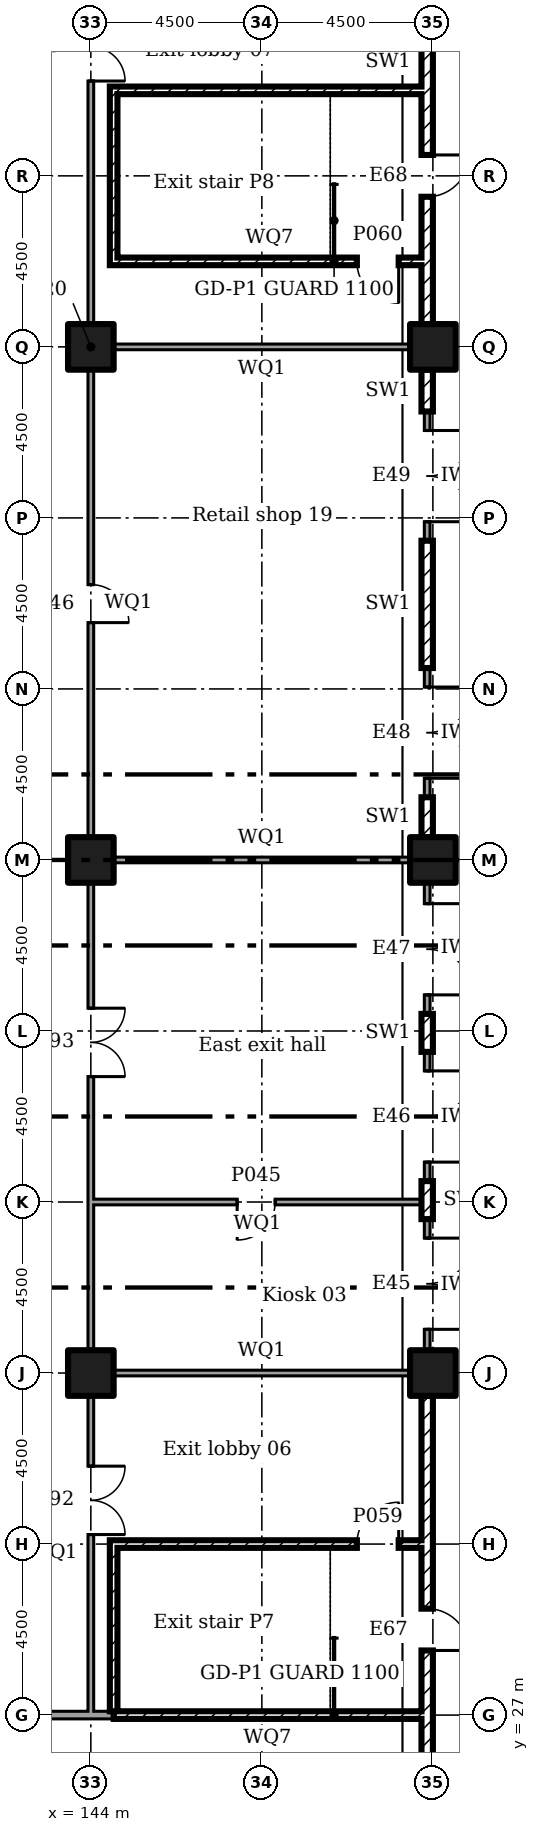
"""IFC4 building model, lengths in metres.
Left out: names, types, materials, properties, quantities, classifications, styles, units other than length and angle.
Written with IfcOpenShell. Run it as: python <this file> out.ifc"""

import sys

from ifc_helpers import new_model, si_unit, direction, frame, frame_2d, origin, origin_2d, place, context, subcontext, project, spatial, rectangle, extrude, element, fill, save


model = new_model("IFC4")
c1 = context("Model", 3, precision=1e-05, world=origin(), true_north=direction((0.0, 1.0)))
c2 = subcontext(c1, "Body", "Model", "MODEL_VIEW")
j1 = project(units=[si_unit("LENGTHUNIT", "METRE"), si_unit("PLANEANGLEUNIT", "RADIAN")], contexts=[c1])
p1 = place(None, origin())
s1 = spatial("IfcSite", under=j1, at=p1, CompositionType="ELEMENT")
p2 = place(p1, origin())
s2 = spatial("IfcBuilding", under=s1, at=p2, CompositionType="ELEMENT")
p3 = place(p2, origin())
s3 = spatial("IfcBuildingStorey", under=s2, at=p3, CompositionType="ELEMENT", Elevation=0.0)
for number, where in (
    (1, (144.0, 36.0, 0.0)),
    (2, (144.0, 49.5, 0.0)),
    (3, (144.0, 63.0, 0.0)),
    (4, (153.0, 36.0, 0.0)),
    (5, (153.0, 49.5, 0.0)),
    (6, (153.0, 63.0, 0.0)),
):
    element("IfcColumn", number, at=place(p3, frame(where)), inside=s3, PredefinedType="COLUMN", context=c2, shape_type="SweptSolid", body=[
        extrude(rectangle(XDim=1.2, YDim=1.2, at=origin_2d()), origin(), (0.0, 0.0, 1.0), 6.0),
    ])
p4 = place(p3, frame((152.85, 23.1, 0.0), z_axis=(0.0, 0.0, 1.0), x_axis=(0.0, 1.0, 0.0)))
e7 = element("IfcWall", 7, at=p4, inside=s3, PredefinedType="ELEMENTEDWALL", context=c2, shape_type="SweptSolid", body=[
    extrude(rectangle(XDim=5.1, YDim=0.3, at=frame_2d((2.55, 0.0))), origin(), (0.0, 0.0, 1.0), 5.55),
])
p5 = place(p3, frame((152.85, 28.2, 0.0), z_axis=(0.0, 0.0, 1.0), x_axis=(0.0, 1.0, 0.0)))
e8 = element("IfcWall", 8, at=p5, inside=s3, PredefinedType="ELEMENTEDWALL", context=c2, shape_type="SweptSolid", body=[
    extrude(rectangle(XDim=2.1, YDim=0.3, at=frame_2d((1.05, 0.0))), origin(), (0.0, 0.0, 1.0), 5.55),
])
p6 = place(p5, frame((0.5, 0.0, 0.0)))
e9 = element("IfcOpeningElement", 9, at=p6, cuts=e8, PredefinedType="OPENING", context=c2, shape_type="SweptSolid", body=[
    extrude(rectangle(XDim=1.1, YDim=2.4, at=frame_2d((0.55, 1.2))), frame((0.0, 0.16, 0.0), z_axis=(0.0, -1.0, 0.0), x_axis=(1.0, 0.0, 0.0)), (0.0, 0.0, 1.0), 0.32),
])
p7 = place(p3, frame((152.85, 30.3, 0.0), z_axis=(0.0, 0.0, 1.0), x_axis=(0.0, 1.0, 0.0)))
e10 = element("IfcWall", 10, at=p7, inside=s3, PredefinedType="ELEMENTEDWALL", context=c2, shape_type="SweptSolid", body=[
    extrude(rectangle(XDim=5.1, YDim=0.3, at=frame_2d((2.55, 0.0))), origin(), (0.0, 0.0, 1.0), 5.55),
])
p8 = place(p3, frame((152.85, 36.6, 0.0), z_axis=(0.0, 0.0, 1.0), x_axis=(0.0, 1.0, 0.0)))
e11 = element("IfcWall", 11, at=p8, inside=s3, PredefinedType="SOLIDWALL", context=c2, shape_type="SweptSolid", body=[
    extrude(rectangle(XDim=3.45, YDim=0.15, at=frame_2d((1.725, 0.0))), origin(), (0.0, 0.0, 1.0), 5.55),
])
p9 = place(p8, frame((0.55, 0.0, 0.0)))
e12 = element("IfcOpeningElement", 12, at=p9, cuts=e11, PredefinedType="OPENING", context=c2, shape_type="SweptSolid", body=[
    extrude(rectangle(XDim=2.4, YDim=2.7, at=frame_2d((1.2, 1.35))), frame((0.0, 0.085, 0.0), z_axis=(0.0, -1.0, 0.0), x_axis=(1.0, 0.0, 0.0)), (0.0, 0.0, 1.0), 0.17),
])
p10 = place(p3, frame((152.85, 40.05, 0.0), z_axis=(0.0, 0.0, 1.0), x_axis=(0.0, 1.0, 0.0)))
e13 = element("IfcWall", 13, at=p10, inside=s3, PredefinedType="ELEMENTEDWALL", context=c2, shape_type="SweptSolid", body=[
    extrude(rectangle(XDim=1.0, YDim=0.3, at=frame_2d((0.5, 0.0))), origin(), (0.0, 0.0, 1.0), 5.55),
])
p11 = place(p3, frame((152.85, 41.05, 0.0), z_axis=(0.0, 0.0, 1.0), x_axis=(0.0, 1.0, 0.0)))
e14 = element("IfcWall", 14, at=p11, inside=s3, PredefinedType="SOLIDWALL", context=c2, shape_type="SweptSolid", body=[
    extrude(rectangle(XDim=3.4, YDim=0.15, at=frame_2d((1.7, 0.0))), origin(), (0.0, 0.0, 1.0), 5.55),
])
p12 = place(p11, frame((0.5, 0.0, 0.0)))
e15 = element("IfcOpeningElement", 15, at=p12, cuts=e14, PredefinedType="OPENING", context=c2, shape_type="SweptSolid", body=[
    extrude(rectangle(XDim=2.4, YDim=2.7, at=frame_2d((1.2, 1.35))), frame((0.0, 0.085, 0.0), z_axis=(0.0, -1.0, 0.0), x_axis=(1.0, 0.0, 0.0)), (0.0, 0.0, 1.0), 0.17),
])
p13 = place(p3, frame((152.85, 44.45, 0.0), z_axis=(0.0, 0.0, 1.0), x_axis=(0.0, 1.0, 0.0)))
e16 = element("IfcWall", 16, at=p13, inside=s3, PredefinedType="ELEMENTEDWALL", context=c2, shape_type="SweptSolid", body=[
    extrude(rectangle(XDim=1.0, YDim=0.3, at=frame_2d((0.5, 0.0))), origin(), (0.0, 0.0, 1.0), 5.55),
])
p14 = place(p3, frame((152.85, 45.45, 0.0), z_axis=(0.0, 0.0, 1.0), x_axis=(0.0, 1.0, 0.0)))
e17 = element("IfcWall", 17, at=p14, inside=s3, PredefinedType="SOLIDWALL", context=c2, shape_type="SweptSolid", body=[
    extrude(rectangle(XDim=3.45, YDim=0.15, at=frame_2d((1.725, 0.0))), origin(), (0.0, 0.0, 1.0), 5.55),
])
p15 = place(p14, frame((0.5, 0.0, 0.0)))
e18 = element("IfcOpeningElement", 18, at=p15, cuts=e17, PredefinedType="OPENING", context=c2, shape_type="SweptSolid", body=[
    extrude(rectangle(XDim=2.4, YDim=2.7, at=frame_2d((1.2, 1.35))), frame((0.0, 0.085, 0.0), z_axis=(0.0, -1.0, 0.0), x_axis=(1.0, 0.0, 0.0)), (0.0, 0.0, 1.0), 0.17),
])
p16 = place(p3, frame((152.85, 50.1, 0.0), z_axis=(0.0, 0.0, 1.0), x_axis=(0.0, 1.0, 0.0)))
e19 = element("IfcWall", 19, at=p16, inside=s3, PredefinedType="ELEMENTEDWALL", context=c2, shape_type="SweptSolid", body=[
    extrude(rectangle(XDim=1.05, YDim=0.3, at=frame_2d((0.525, 0.0))), origin(), (0.0, 0.0, 1.0), 5.55),
])
p17 = place(p3, frame((152.85, 51.15, 0.0), z_axis=(0.0, 0.0, 1.0), x_axis=(0.0, 1.0, 0.0)))
e20 = element("IfcWall", 20, at=p17, inside=s3, PredefinedType="SOLIDWALL", context=c2, shape_type="SweptSolid", body=[
    extrude(rectangle(XDim=3.4, YDim=0.15, at=frame_2d((1.7, 0.0))), origin(), (0.0, 0.0, 1.0), 5.55),
])
p18 = place(p17, frame((0.5, 0.0, 0.0)))
e21 = element("IfcOpeningElement", 21, at=p18, cuts=e20, PredefinedType="OPENING", context=c2, shape_type="SweptSolid", body=[
    extrude(rectangle(XDim=2.4, YDim=2.7, at=frame_2d((1.2, 1.35))), frame((0.0, 0.085, 0.0), z_axis=(0.0, -1.0, 0.0), x_axis=(1.0, 0.0, 0.0)), (0.0, 0.0, 1.0), 0.17),
])
p19 = place(p3, frame((152.85, 54.55, 0.0), z_axis=(0.0, 0.0, 1.0), x_axis=(0.0, 1.0, 0.0)))
e22 = element("IfcWall", 22, at=p19, inside=s3, PredefinedType="ELEMENTEDWALL", context=c2, shape_type="SweptSolid", body=[
    extrude(rectangle(XDim=3.35, YDim=0.3, at=frame_2d((1.675, 0.0))), origin(), (0.0, 0.0, 1.0), 5.55),
])
p20 = place(p3, frame((152.85, 57.9, 0.0), z_axis=(0.0, 0.0, 1.0), x_axis=(0.0, 1.0, 0.0)))
e23 = element("IfcWall", 23, at=p20, inside=s3, PredefinedType="SOLIDWALL", context=c2, shape_type="SweptSolid", body=[
    extrude(rectangle(XDim=3.4, YDim=0.15, at=frame_2d((1.7, 0.0))), origin(), (0.0, 0.0, 1.0), 5.55),
])
p21 = place(p20, frame((0.5, 0.0, 0.0)))
e24 = element("IfcOpeningElement", 24, at=p21, cuts=e23, PredefinedType="OPENING", context=c2, shape_type="SweptSolid", body=[
    extrude(rectangle(XDim=2.4, YDim=2.7, at=frame_2d((1.2, 1.35))), frame((0.0, 0.085, 0.0), z_axis=(0.0, -1.0, 0.0), x_axis=(1.0, 0.0, 0.0)), (0.0, 0.0, 1.0), 0.17),
])
p22 = place(p3, frame((152.85, 61.3, 0.0), z_axis=(0.0, 0.0, 1.0), x_axis=(0.0, 1.0, 0.0)))
e25 = element("IfcWall", 25, at=p22, inside=s3, PredefinedType="ELEMENTEDWALL", context=c2, shape_type="SweptSolid", body=[
    extrude(rectangle(XDim=1.1, YDim=0.3, at=frame_2d((0.55, 0.0))), origin(), (0.0, 0.0, 1.0), 5.55),
])
p23 = place(p3, frame((152.85, 63.6, 0.0), z_axis=(0.0, 0.0, 1.0), x_axis=(0.0, 1.0, 0.0)))
e26 = element("IfcWall", 26, at=p23, inside=s3, PredefinedType="ELEMENTEDWALL", context=c2, shape_type="SweptSolid", body=[
    extrude(rectangle(XDim=2.85, YDim=0.3, at=frame_2d((1.425, 0.0))), origin(), (0.0, 0.0, 1.0), 5.55),
])
p24 = place(p3, frame((152.85, 66.45, 0.0), z_axis=(0.0, 0.0, 1.0), x_axis=(0.0, 1.0, 0.0)))
e27 = element("IfcWall", 27, at=p24, inside=s3, PredefinedType="ELEMENTEDWALL", context=c2, shape_type="SweptSolid", body=[
    extrude(rectangle(XDim=2.1, YDim=0.3, at=frame_2d((1.05, 0.0))), origin(), (0.0, 0.0, 1.0), 5.55),
])
p25 = place(p24, frame((0.5, 0.0, 0.0)))
e28 = element("IfcOpeningElement", 28, at=p25, cuts=e27, PredefinedType="OPENING", context=c2, shape_type="SweptSolid", body=[
    extrude(rectangle(XDim=1.1, YDim=2.4, at=frame_2d((0.55, 1.2))), frame((0.0, 0.16, 0.0), z_axis=(0.0, -1.0, 0.0), x_axis=(1.0, 0.0, 0.0)), (0.0, 0.0, 1.0), 0.32),
])
p26 = place(p3, frame((152.85, 68.55, 0.0), z_axis=(0.0, 0.0, 1.0), x_axis=(0.0, 1.0, 0.0)))
e29 = element("IfcWall", 29, at=p26, inside=s3, PredefinedType="ELEMENTEDWALL", context=c2, shape_type="SweptSolid", body=[
    extrude(rectangle(XDim=3.9, YDim=0.3, at=frame_2d((1.95, 0.0))), origin(), (0.0, 0.0, 1.0), 5.55),
])
p27 = place(p3, frame((139.5, 27.0, 0.0)))
e30 = element("IfcWall", 30, at=p27, inside=s3, PredefinedType="SOLIDWALL", context=c2, shape_type="SweptSolid", body=[
    extrude(rectangle(XDim=4.575, YDim=0.2, at=frame_2d((2.288, 0.0))), origin(), (0.0, 0.0, 1.0), 5.55),
])
p28 = place(p3, frame((144.0, 27.0, 0.0)))
e31 = element("IfcWall", 31, at=p28, inside=s3, PredefinedType="SOLIDWALL", context=c2, shape_type="SweptSolid", body=[
    extrude(rectangle(XDim=0.7, YDim=0.2, at=frame_2d((0.35, 0.0))), origin(), (0.0, 0.0, 1.0), 5.55),
])
p29 = place(p3, frame((144.6, 27.0, 0.0)))
e32 = element("IfcWall", 32, at=p29, inside=s3, PredefinedType="SOLIDWALL", context=c2, shape_type="SweptSolid", body=[
    extrude(rectangle(XDim=8.1, YDim=0.2, at=frame_2d((4.05, 0.0))), origin(), (0.0, 0.0, 1.0), 5.55),
])
p30 = place(p3, frame((144.0, 27.1, 0.0), z_axis=(0.0, 0.0, 1.0), x_axis=(0.0, 1.0, 0.0)))
e33 = element("IfcWall", 33, at=p30, inside=s3, PredefinedType="PARTITIONING", context=c2, shape_type="SweptSolid", body=[
    extrude(rectangle(XDim=8.305, YDim=0.15, at=frame_2d((4.152, 0.0))), origin(), (0.0, 0.0, 1.0), 5.55),
])
p31 = place(p30, frame((4.65, 0.0, 0.0)))
e34 = element("IfcOpeningElement", 34, at=p31, cuts=e33, PredefinedType="OPENING", context=c2, shape_type="SweptSolid", body=[
    extrude(rectangle(XDim=1.8, YDim=2.1, at=frame_2d((0.9, 1.05))), frame((0.0, 0.085, 0.0), z_axis=(0.0, -1.0, 0.0), x_axis=(1.0, 0.0, 0.0)), (0.0, 0.0, 1.0), 0.17),
])
p32 = place(p3, frame((144.0, 36.595, 0.0), z_axis=(0.0, 0.0, 1.0), x_axis=(0.0, 1.0, 0.0)))
e35 = element("IfcWall", 35, at=p32, inside=s3, PredefinedType="PARTITIONING", context=c2, shape_type="SweptSolid", body=[
    extrude(rectangle(XDim=3.98, YDim=0.15, at=frame_2d((1.99, 0.0))), origin(), (0.0, 0.0, 1.0), 5.55),
])
p33 = place(p3, frame((144.0, 40.5, 0.0), z_axis=(0.0, 0.0, 1.0), x_axis=(0.0, 1.0, 0.0)))
e36 = element("IfcWall", 36, at=p33, inside=s3, PredefinedType="PARTITIONING", context=c2, shape_type="SweptSolid", body=[
    extrude(rectangle(XDim=8.405, YDim=0.15, at=frame_2d((4.203, 0.0))), origin(), (0.0, 0.0, 1.0), 5.55),
])
p34 = place(p33, frame((3.3, 0.0, 0.0)))
e37 = element("IfcOpeningElement", 37, at=p34, cuts=e36, PredefinedType="OPENING", context=c2, shape_type="SweptSolid", body=[
    extrude(rectangle(XDim=1.8, YDim=2.1, at=frame_2d((0.9, 1.05))), frame((0.0, 0.085, 0.0), z_axis=(0.0, -1.0, 0.0), x_axis=(1.0, 0.0, 0.0)), (0.0, 0.0, 1.0), 0.17),
])
p35 = place(p3, frame((144.0, 50.095, 0.0), z_axis=(0.0, 0.0, 1.0), x_axis=(0.0, 1.0, 0.0)))
e38 = element("IfcWall", 38, at=p35, inside=s3, PredefinedType="PARTITIONING", context=c2, shape_type="SweptSolid", body=[
    extrude(rectangle(XDim=12.31, YDim=0.15, at=frame_2d((6.155, 0.0))), origin(), (0.0, 0.0, 1.0), 5.55),
])
p36 = place(p35, frame((5.65, 0.0, 0.0)))
e39 = element("IfcOpeningElement", 39, at=p36, cuts=e38, PredefinedType="OPENING", context=c2, shape_type="SweptSolid", body=[
    extrude(rectangle(XDim=1.0, YDim=2.1, at=frame_2d((0.5, 1.05))), frame((0.0, 0.085, 0.0), z_axis=(0.0, -1.0, 0.0), x_axis=(1.0, 0.0, 0.0)), (0.0, 0.0, 1.0), 0.17),
])
p37 = place(p3, frame((144.0, 63.595, 0.0), z_axis=(0.0, 0.0, 1.0), x_axis=(0.0, 1.0, 0.0)))
e40 = element("IfcWall", 40, at=p37, inside=s3, PredefinedType="PARTITIONING", context=c2, shape_type="SweptSolid", body=[
    extrude(rectangle(XDim=8.48, YDim=0.15, at=frame_2d((4.24, 0.0))), origin(), (0.0, 0.0, 1.0), 5.55),
])
p38 = place(p37, frame((6.4, 0.0, 0.0)))
e41 = element("IfcOpeningElement", 41, at=p38, cuts=e40, PredefinedType="OPENING", context=c2, shape_type="SweptSolid", body=[
    extrude(rectangle(XDim=1.8, YDim=2.1, at=frame_2d((0.9, 1.05))), frame((0.0, 0.085, 0.0), z_axis=(0.0, -1.0, 0.0), x_axis=(1.0, 0.0, 0.0)), (0.0, 0.0, 1.0), 0.17),
])
p39 = place(p3, frame((144.595, 36.0, 0.0)))
e42 = element("IfcWall", 42, at=p39, inside=s3, PredefinedType="PARTITIONING", context=c2, shape_type="SweptSolid", body=[
    extrude(rectangle(XDim=7.81, YDim=0.15, at=frame_2d((3.905, 0.0))), origin(), (0.0, 0.0, 1.0), 5.55),
])
p40 = place(p3, frame((144.6, 27.1, 0.0), z_axis=(0.0, 0.0, 1.0), x_axis=(0.0, 1.0, 0.0)))
e43 = element("IfcWall", 43, at=p40, inside=s3, PredefinedType="SOLIDWALL", context=c2, shape_type="SweptSolid", body=[
    extrude(rectangle(XDim=4.5, YDim=0.2, at=frame_2d((2.25, 0.0))), origin(), (0.0, 0.0, 1.0), 5.55),
])
p41 = place(p3, frame((144.7, 31.5, 0.0)))
e44 = element("IfcWall", 44, at=p41, inside=s3, PredefinedType="SOLIDWALL", context=c2, shape_type="SweptSolid", body=[
    extrude(rectangle(XDim=8.0, YDim=0.2, at=frame_2d((4.0, 0.0))), origin(), (0.0, 0.0, 1.0), 5.55),
])
p42 = place(p41, frame((6.3, 0.0, 0.0)))
e45 = element("IfcOpeningElement", 45, at=p42, cuts=e44, PredefinedType="OPENING", context=c2, shape_type="SweptSolid", body=[
    extrude(rectangle(XDim=1.1, YDim=2.1, at=frame_2d((0.55, 1.05))), frame((0.0, 0.11, 0.0), z_axis=(0.0, -1.0, 0.0), x_axis=(1.0, 0.0, 0.0)), (0.0, 0.0, 1.0), 0.22),
])
p43 = place(p3, frame((144.075, 40.5, 0.0)))
e46 = element("IfcWall", 46, at=p43, inside=s3, PredefinedType="PARTITIONING", context=c2, shape_type="SweptSolid", body=[
    extrude(rectangle(XDim=8.625, YDim=0.15, at=frame_2d((4.312, 0.0))), origin(), (0.0, 0.0, 1.0), 5.55),
])
p44 = place(p43, frame((3.775, 0.0, 0.0)))
e47 = element("IfcOpeningElement", 47, at=p44, cuts=e46, PredefinedType="OPENING", context=c2, shape_type="SweptSolid", body=[
    extrude(rectangle(XDim=1.0, YDim=2.1, at=frame_2d((0.5, 1.05))), frame((0.0, 0.085, 0.0), z_axis=(0.0, -1.0, 0.0), x_axis=(1.0, 0.0, 0.0)), (0.0, 0.0, 1.0), 0.17),
])
for number, where in (
    (48, (144.595, 49.5, 0.0)),
    (49, (144.595, 63.0, 0.0)),
):
    element("IfcWall", number, at=place(p3, frame(where)), inside=s3, PredefinedType="PARTITIONING", context=c2, shape_type="SweptSolid", body=[
        extrude(rectangle(XDim=7.81, YDim=0.15, at=frame_2d((3.905, 0.0))), origin(), (0.0, 0.0, 1.0), 5.55),
    ])
p45 = place(p3, frame((144.6, 65.15, 0.0), z_axis=(0.0, 0.0, 1.0), x_axis=(0.0, 1.0, 0.0)))
e50 = element("IfcWall", 50, at=p45, inside=s3, PredefinedType="SOLIDWALL", context=c2, shape_type="SweptSolid", body=[
    extrude(rectangle(XDim=4.7, YDim=0.2, at=frame_2d((2.35, 0.0))), origin(), (0.0, 0.0, 1.0), 5.55),
])
p46 = place(p3, frame((144.7, 65.25, 0.0)))
e51 = element("IfcWall", 51, at=p46, inside=s3, PredefinedType="SOLIDWALL", context=c2, shape_type="SweptSolid", body=[
    extrude(rectangle(XDim=8.0, YDim=0.2, at=frame_2d((4.0, 0.0))), origin(), (0.0, 0.0, 1.0), 5.55),
])
p47 = place(p46, frame((6.3, 0.0, 0.0)))
e52 = element("IfcOpeningElement", 52, at=p47, cuts=e51, PredefinedType="OPENING", context=c2, shape_type="SweptSolid", body=[
    extrude(rectangle(XDim=1.1, YDim=2.1, at=frame_2d((0.55, 1.05))), frame((0.0, 0.11, 0.0), z_axis=(0.0, -1.0, 0.0), x_axis=(1.0, 0.0, 0.0)), (0.0, 0.0, 1.0), 0.22),
])
p48 = place(p3, frame((144.7, 69.75, 0.0)))
e53 = element("IfcWall", 53, at=p48, inside=s3, PredefinedType="SOLIDWALL", context=c2, shape_type="SweptSolid", body=[
    extrude(rectangle(XDim=8.0, YDim=0.2, at=frame_2d((4.0, 0.0))), origin(), (0.0, 0.0, 1.0), 5.55),
])
p49 = place(p6, frame((1.1, 0.0, 0.0), x_axis=(-1.0, 0.0, 0.0)))
e54 = element("IfcDoor", 54, at=p49, inside=s3, OperationType="SINGLE_SWING_LEFT", PredefinedType="NOTDEFINED", context=c2, shape_type="SweptSolid", body=[
    extrude(rectangle(XDim=1.1, YDim=2.4, at=frame_2d((0.55, 1.2))), frame((0.0, 0.025, 0.0), z_axis=(0.0, -1.0, 0.0), x_axis=(1.0, 0.0, 0.0)), (0.0, 0.0, 1.0), 0.05),
])
fill(e9, e54)
p50 = place(p9, frame((2.4, 0.0, 0.0), x_axis=(-1.0, 0.0, 0.0)))
e55 = element("IfcDoor", 55, at=p50, inside=s3, OperationType="DOUBLE_DOOR_DOUBLE_SWING", PredefinedType="NOTDEFINED", context=c2, shape_type="SweptSolid", body=[
    extrude(rectangle(XDim=2.4, YDim=2.7, at=frame_2d((1.2, 1.35))), frame((0.0, 0.025, 0.0), z_axis=(0.0, -1.0, 0.0), x_axis=(1.0, 0.0, 0.0)), (0.0, 0.0, 1.0), 0.05),
])
fill(e12, e55)
p51 = place(p12, frame((2.4, 0.0, 0.0), x_axis=(-1.0, 0.0, 0.0)))
e56 = element("IfcDoor", 56, at=p51, inside=s3, OperationType="DOUBLE_DOOR_DOUBLE_SWING", PredefinedType="NOTDEFINED", context=c2, shape_type="SweptSolid", body=[
    extrude(rectangle(XDim=2.4, YDim=2.7, at=frame_2d((1.2, 1.35))), frame((0.0, 0.025, 0.0), z_axis=(0.0, -1.0, 0.0), x_axis=(1.0, 0.0, 0.0)), (0.0, 0.0, 1.0), 0.05),
])
fill(e15, e56)
p52 = place(p15, frame((2.4, 0.0, 0.0), x_axis=(-1.0, 0.0, 0.0)))
e57 = element("IfcDoor", 57, at=p52, inside=s3, OperationType="DOUBLE_DOOR_DOUBLE_SWING", PredefinedType="NOTDEFINED", context=c2, shape_type="SweptSolid", body=[
    extrude(rectangle(XDim=2.4, YDim=2.7, at=frame_2d((1.2, 1.35))), frame((0.0, 0.025, 0.0), z_axis=(0.0, -1.0, 0.0), x_axis=(1.0, 0.0, 0.0)), (0.0, 0.0, 1.0), 0.05),
])
fill(e18, e57)
p53 = place(p18, frame((2.4, 0.0, 0.0), x_axis=(-1.0, 0.0, 0.0)))
e58 = element("IfcDoor", 58, at=p53, inside=s3, OperationType="DOUBLE_DOOR_DOUBLE_SWING", PredefinedType="NOTDEFINED", context=c2, shape_type="SweptSolid", body=[
    extrude(rectangle(XDim=2.4, YDim=2.7, at=frame_2d((1.2, 1.35))), frame((0.0, 0.025, 0.0), z_axis=(0.0, -1.0, 0.0), x_axis=(1.0, 0.0, 0.0)), (0.0, 0.0, 1.0), 0.05),
])
fill(e21, e58)
p54 = place(p21, frame((2.4, 0.0, 0.0), x_axis=(-1.0, 0.0, 0.0)))
e59 = element("IfcDoor", 59, at=p54, inside=s3, OperationType="DOUBLE_DOOR_DOUBLE_SWING", PredefinedType="NOTDEFINED", context=c2, shape_type="SweptSolid", body=[
    extrude(rectangle(XDim=2.4, YDim=2.7, at=frame_2d((1.2, 1.35))), frame((0.0, 0.025, 0.0), z_axis=(0.0, -1.0, 0.0), x_axis=(1.0, 0.0, 0.0)), (0.0, 0.0, 1.0), 0.05),
])
fill(e24, e59)
p55 = place(p25, frame((1.1, 0.0, 0.0), x_axis=(-1.0, 0.0, 0.0)))
e60 = element("IfcDoor", 60, at=p55, inside=s3, OperationType="SINGLE_SWING_RIGHT", PredefinedType="NOTDEFINED", context=c2, shape_type="SweptSolid", body=[
    extrude(rectangle(XDim=1.1, YDim=2.4, at=frame_2d((0.55, 1.2))), frame((0.0, 0.025, 0.0), z_axis=(0.0, -1.0, 0.0), x_axis=(1.0, 0.0, 0.0)), (0.0, 0.0, 1.0), 0.05),
])
fill(e28, e60)
p56 = place(p44, frame((1.0, 0.0, 0.0), x_axis=(-1.0, 0.0, 0.0)))
e61 = element("IfcDoor", 61, at=p56, inside=s3, OperationType="SINGLE_SWING_LEFT", PredefinedType="DOOR", context=c2, shape_type="SweptSolid", body=[
    extrude(rectangle(XDim=1.0, YDim=2.1, at=frame_2d((0.5, 1.05))), frame((0.0, 0.025, 0.0), z_axis=(0.0, -1.0, 0.0), x_axis=(1.0, 0.0, 0.0)), (0.0, 0.0, 1.0), 0.05),
])
fill(e47, e61)
p57 = place(p36, frame((1.0, 0.0, 0.0), x_axis=(-1.0, 0.0, 0.0)))
e62 = element("IfcDoor", 62, at=p57, inside=s3, OperationType="SINGLE_SWING_LEFT", PredefinedType="DOOR", context=c2, shape_type="SweptSolid", body=[
    extrude(rectangle(XDim=1.0, YDim=2.1, at=frame_2d((0.5, 1.05))), frame((0.0, 0.025, 0.0), z_axis=(0.0, -1.0, 0.0), x_axis=(1.0, 0.0, 0.0)), (0.0, 0.0, 1.0), 0.05),
])
fill(e39, e62)
p58 = place(p42, origin())
e63 = element("IfcDoor", 63, at=p58, inside=s3, OperationType="SINGLE_SWING_LEFT", PredefinedType="DOOR", context=c2, shape_type="SweptSolid", body=[
    extrude(rectangle(XDim=1.1, YDim=2.1, at=frame_2d((0.55, 1.05))), frame((0.0, 0.025, 0.0), z_axis=(0.0, -1.0, 0.0), x_axis=(1.0, 0.0, 0.0)), (0.0, 0.0, 1.0), 0.05),
])
fill(e45, e63)
p59 = place(p47, frame((1.1, 0.0, 0.0), x_axis=(-1.0, 0.0, 0.0)))
e64 = element("IfcDoor", 64, at=p59, inside=s3, OperationType="SINGLE_SWING_RIGHT", PredefinedType="DOOR", context=c2, shape_type="SweptSolid", body=[
    extrude(rectangle(XDim=1.1, YDim=2.1, at=frame_2d((0.55, 1.05))), frame((0.0, 0.025, 0.0), z_axis=(0.0, -1.0, 0.0), x_axis=(1.0, 0.0, 0.0)), (0.0, 0.0, 1.0), 0.05),
])
fill(e52, e64)
p60 = place(p31, frame((1.8, 0.0, 0.0), x_axis=(-1.0, 0.0, 0.0)))
e65 = element("IfcDoor", 65, at=p60, inside=s3, OperationType="DOUBLE_DOOR_SINGLE_SWING", PredefinedType="DOOR", context=c2, shape_type="SweptSolid", body=[
    extrude(rectangle(XDim=1.8, YDim=2.1, at=frame_2d((0.9, 1.05))), frame((0.0, 0.025, 0.0), z_axis=(0.0, -1.0, 0.0), x_axis=(1.0, 0.0, 0.0)), (0.0, 0.0, 1.0), 0.05),
])
fill(e34, e65)
p61 = place(p34, frame((1.8, 0.0, 0.0), x_axis=(-1.0, 0.0, 0.0)))
e66 = element("IfcDoor", 66, at=p61, inside=s3, OperationType="DOUBLE_DOOR_SINGLE_SWING", PredefinedType="DOOR", context=c2, shape_type="SweptSolid", body=[
    extrude(rectangle(XDim=1.8, YDim=2.1, at=frame_2d((0.9, 1.05))), frame((0.0, 0.025, 0.0), z_axis=(0.0, -1.0, 0.0), x_axis=(1.0, 0.0, 0.0)), (0.0, 0.0, 1.0), 0.05),
])
fill(e37, e66)
p62 = place(p38, frame((1.8, 0.0, 0.0), x_axis=(-1.0, 0.0, 0.0)))
e67 = element("IfcDoor", 67, at=p62, inside=s3, OperationType="DOUBLE_DOOR_SINGLE_SWING", PredefinedType="DOOR", context=c2, shape_type="SweptSolid", body=[
    extrude(rectangle(XDim=1.8, YDim=2.1, at=frame_2d((0.9, 1.05))), frame((0.0, 0.025, 0.0), z_axis=(0.0, -1.0, 0.0), x_axis=(1.0, 0.0, 0.0)), (0.0, 0.0, 1.0), 0.05),
])
fill(e41, e67)
save(model, sys.argv[1])
